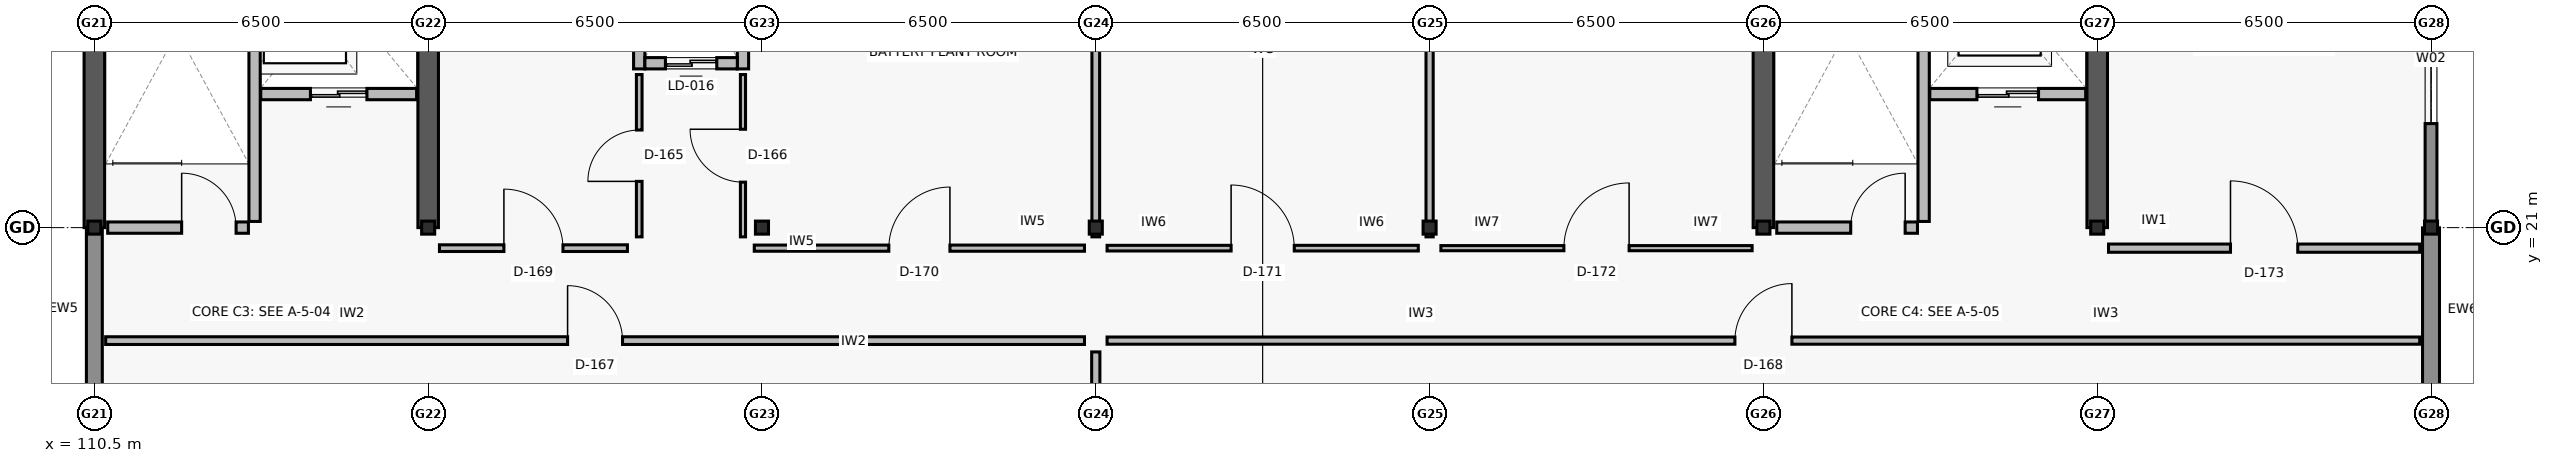
"""IFC4 building model, lengths in metres.
Left out: names, types, materials, properties, quantities, classifications, styles, units other than length and angle.
Written with IfcOpenShell. Run it as: python <this file> out.ifc"""

import sys

from ifc_helpers import new_model, si_unit, direction, frame, frame_2d, origin, origin_2d, place, context, subcontext, project, spatial, rectangle, i_section, extrude, element, fill, save


model = new_model("IFC4")
c1 = context("Model", 3, precision=1e-05, world=origin(), true_north=direction((0.0, 1.0)))
c2 = subcontext(c1, "Body", "Model", "MODEL_VIEW")
j1 = project(units=[si_unit("LENGTHUNIT", "METRE"), si_unit("PLANEANGLEUNIT", "RADIAN")], contexts=[c1])
p1 = place(None, origin())
s1 = spatial("IfcSite", under=j1, at=p1, CompositionType="ELEMENT")
p2 = place(p1, origin())
s2 = spatial("IfcBuilding", under=s1, at=p2, CompositionType="ELEMENT")
p3 = place(p2, frame((0.0, 0.0, 21.3)))
s3 = spatial("IfcBuildingStorey", under=s2, at=p3, CompositionType="ELEMENT", Elevation=21.3)
for number, where, z_axis, x_axis in (
    (1, (110.5, 21.0, 0.0), (0.0, 0.0, 1.0), (1.0, 0.0, 0.0)),
    (2, (117.0, 21.0, 0.0), (0.0, 0.0, 1.0), (1.0, 0.0, 0.0)),
    (3, (123.5, 21.0, 0.0), (0.0, 0.0, 1.0), (1.0, 0.0, 0.0)),
    (4, (130.0, 21.0, 0.0), (0.0, 0.0, 1.0), (1.0, 0.0, 0.0)),
    (5, (136.5, 21.0, 0.0), (0.0, 0.0, 1.0), (1.0, 0.0, 0.0)),
    (6, (143.0, 21.0, 0.0), (0.0, 0.0, 1.0), (1.0, 0.0, 0.0)),
    (7, (149.5, 21.0, 0.0), (0.0, 0.0, 1.0), (1.0, 0.0, 0.0)),
    (8, (156.0, 21.0, 0.0), (0.0, 0.0, 1.0), (1.0, 0.0, 0.0)),
):
    element("IfcColumn", number, at=place(p3, frame(where, z_axis=z_axis, x_axis=x_axis)), inside=s3, PredefinedType="COLUMN", context=c2, shape_type="SweptSolid", body=[
        extrude(i_section(OverallWidth=0.254, OverallDepth=0.254, WebThickness=0.009, FlangeThickness=0.014, FilletRadius=0.013, at=origin_2d()), origin(), (0.0, 0.0, 1.0), 3.9),
    ])
for number, where, z_axis, x_axis in (
    (9, (110.5, 21.0, 0.0), (0.0, 0.0, 1.0), (0.0, 1.0, 0.0)),
    (10, (117.0, 21.0, 0.0), (0.0, 0.0, 1.0), (0.0, 1.0, 0.0)),
    (11, (143.0, 21.0, 0.0), (0.0, 0.0, 1.0), (0.0, 1.0, 0.0)),
    (12, (149.5, 21.0, 0.0), (0.0, 0.0, 1.0), (0.0, 1.0, 0.0)),
):
    element("IfcWall", number, at=place(p3, frame(where, z_axis=z_axis, x_axis=x_axis)), inside=s3, PredefinedType="SHEAR", context=c2, shape_type="SweptSolid", body=[
        extrude(rectangle(XDim=6.4, YDim=0.4, at=frame_2d((3.2, 0.0))), origin(), (0.0, 0.0, 1.0), 3.66),
    ])
p4 = place(p3, frame((110.5, 14.405, 0.0), z_axis=(0.0, 0.0, 1.0), x_axis=(0.0, 1.0, 0.0)))
e13 = element("IfcWall", 13, at=p4, inside=s3, PredefinedType="SOLIDWALL", context=c2, shape_type="SweptSolid", body=[
    extrude(rectangle(XDim=6.59, YDim=0.31, at=frame_2d((3.295, 0.0))), origin(), (0.0, 0.0, 1.0), 3.02),
])
p5 = place(p4, frame((0.988, 0.0, 0.8)))
e14 = element("IfcOpeningElement", 14, at=p5, cuts=e13, PredefinedType="OPENING", context=c2, shape_type="SweptSolid", body=[
    extrude(rectangle(XDim=2.45, YDim=1.95, at=frame_2d((1.225, 0.975))), frame((0.0, 0.165, 0.0), z_axis=(0.0, -1.0, 0.0), x_axis=(1.0, 0.0, 0.0)), (0.0, 0.0, 1.0), 0.33),
])
p6 = place(p3, frame((156.0, 20.995, 0.0), z_axis=(0.0, 0.0, 1.0), x_axis=(0.0, -1.0, 0.0)))
e15 = element("IfcWall", 15, at=p6, inside=s3, PredefinedType="SOLIDWALL", context=c2, shape_type="SweptSolid", body=[
    extrude(rectangle(XDim=6.59, YDim=0.33, at=frame_2d((3.295, 0.0))), origin(), (0.0, 0.0, 1.0), 3.02),
])
p7 = place(p6, frame((3.177, 0.0, 0.72)))
e16 = element("IfcOpeningElement", 16, at=p7, cuts=e15, PredefinedType="OPENING", context=c2, shape_type="SweptSolid", body=[
    extrude(rectangle(XDim=2.4, YDim=2.1, at=frame_2d((1.2, 1.05))), frame((0.0, 0.175, 0.0), z_axis=(0.0, -1.0, 0.0), x_axis=(1.0, 0.0, 0.0)), (0.0, 0.0, 1.0), 0.35),
])
p8 = place(p3, frame((156.0, 27.595, 0.0), z_axis=(0.0, 0.0, 1.0), x_axis=(0.0, -1.0, 0.0)))
e17 = element("IfcWall", 17, at=p8, inside=s3, PredefinedType="SOLIDWALL", context=c2, shape_type="SweptSolid", body=[
    extrude(rectangle(XDim=6.59, YDim=0.23, at=frame_2d((3.295, 0.0))), origin(), (0.0, 0.0, 1.0), 3.02),
])
p9 = place(p8, frame((2.02, 0.0, 0.72)))
e18 = element("IfcOpeningElement", 18, at=p9, cuts=e17, PredefinedType="OPENING", context=c2, shape_type="SweptSolid", body=[
    extrude(rectangle(XDim=2.55, YDim=2.1, at=frame_2d((1.275, 1.05))), frame((0.0, 0.125, 0.0), z_axis=(0.0, -1.0, 0.0), x_axis=(1.0, 0.0, 0.0)), (0.0, 0.0, 1.0), 0.25),
])
p10 = place(p3, frame((113.62, 21.12, 0.0), z_axis=(0.0, 0.0, 1.0), x_axis=(0.0, 1.0, 0.0)))
e19 = element("IfcWall", 19, at=p10, inside=s3, PredefinedType="SOLIDWALL", context=c2, shape_type="SweptSolid", body=[
    extrude(rectangle(XDim=6.255, YDim=0.22, at=frame_2d((3.127, 0.0))), origin(), (0.0, 0.0, 1.0), 3.02),
])
p11 = place(p3, frame((110.76, 21.0, 0.0), z_axis=(0.0, 0.0, 1.0), x_axis=(1.0, 0.0, 0.0)))
e20 = element("IfcWall", 20, at=p11, inside=s3, PredefinedType="SOLIDWALL", context=c2, shape_type="SweptSolid", body=[
    extrude(rectangle(XDim=2.74, YDim=0.22, at=frame_2d((1.37, 0.0))), origin(), (0.0, 0.0, 1.0), 3.02),
])
p12 = place(p11, frame((1.44, 0.0, 0.0)))
e21 = element("IfcOpeningElement", 21, at=p12, cuts=e20, PredefinedType="OPENING", context=c2, shape_type="SweptSolid", body=[
    extrude(rectangle(XDim=1.06, YDim=2.1, at=frame_2d((0.53, 1.05))), frame((0.0, 0.12, 0.0), z_axis=(0.0, -1.0, 0.0), x_axis=(1.0, 0.0, 0.0)), (0.0, 0.0, 1.0), 0.24),
])
p13 = place(p3, frame((113.74, 23.6, 0.0), z_axis=(0.0, 0.0, 1.0), x_axis=(1.0, 0.0, 0.0)))
e22 = element("IfcWall", 22, at=p13, inside=s3, PredefinedType="SOLIDWALL", context=c2, shape_type="SweptSolid", body=[
    extrude(rectangle(XDim=3.035, YDim=0.22, at=frame_2d((1.518, 0.0))), origin(), (0.0, 0.0, 1.0), 3.02),
])
p14 = place(p13, frame((0.968, 0.0, 0.0)))
e23 = element("IfcOpeningElement", 23, at=p14, cuts=e22, PredefinedType="OPENING", context=c2, shape_type="SweptSolid", body=[
    extrude(rectangle(XDim=1.1, YDim=2.1, at=frame_2d((0.55, 1.05))), frame((0.0, 0.12, 0.0), z_axis=(0.0, -1.0, 0.0), x_axis=(1.0, 0.0, 0.0)), (0.0, 0.0, 1.0), 0.24),
])
for number, where, z_axis, x_axis in (
    (24, (121.11, 24.09, 0.0), (0.0, 0.0, 1.0), (0.0, 1.0, 0.0)),
    (25, (123.13, 24.09, 0.0), (0.0, 0.0, 1.0), (0.0, 1.0, 0.0)),
):
    element("IfcWall", number, at=place(p3, frame(where, z_axis=z_axis, x_axis=x_axis)), inside=s3, PredefinedType="SOLIDWALL", context=c2, shape_type="SweptSolid", body=[
        extrude(rectangle(XDim=3.36, YDim=0.22, at=frame_2d((1.68, 0.0))), origin(), (0.0, 0.0, 1.0), 3.02),
    ])
p15 = place(p3, frame((121.22, 24.2, 0.0), z_axis=(0.0, 0.0, 1.0), x_axis=(1.0, 0.0, 0.0)))
e26 = element("IfcWall", 26, at=p15, inside=s3, PredefinedType="SOLIDWALL", context=c2, shape_type="SweptSolid", body=[
    extrude(rectangle(XDim=1.8, YDim=0.22, at=frame_2d((0.9, 0.0))), origin(), (0.0, 0.0, 1.0), 3.02),
])
p16 = place(p15, frame((0.4, 0.0, 0.0)))
e27 = element("IfcOpeningElement", 27, at=p16, cuts=e26, PredefinedType="OPENING", context=c2, shape_type="SweptSolid", body=[
    extrude(rectangle(XDim=1.0, YDim=2.1, at=frame_2d((0.5, 1.05))), frame((0.0, 0.12, 0.0), z_axis=(0.0, -1.0, 0.0), x_axis=(1.0, 0.0, 0.0)), (0.0, 0.0, 1.0), 0.24),
])
p17 = place(p3, frame((146.12, 21.12, 0.0), z_axis=(0.0, 0.0, 1.0), x_axis=(0.0, 1.0, 0.0)))
e28 = element("IfcWall", 28, at=p17, inside=s3, PredefinedType="SOLIDWALL", context=c2, shape_type="SweptSolid", body=[
    extrude(rectangle(XDim=6.255, YDim=0.22, at=frame_2d((3.127, 0.0))), origin(), (0.0, 0.0, 1.0), 3.02),
])
p18 = place(p3, frame((143.26, 21.0, 0.0), z_axis=(0.0, 0.0, 1.0), x_axis=(1.0, 0.0, 0.0)))
e29 = element("IfcWall", 29, at=p18, inside=s3, PredefinedType="SOLIDWALL", context=c2, shape_type="SweptSolid", body=[
    extrude(rectangle(XDim=2.74, YDim=0.22, at=frame_2d((1.37, 0.0))), origin(), (0.0, 0.0, 1.0), 3.02),
])
p19 = place(p18, frame((1.44, 0.0, 0.0)))
e30 = element("IfcOpeningElement", 30, at=p19, cuts=e29, PredefinedType="OPENING", context=c2, shape_type="SweptSolid", body=[
    extrude(rectangle(XDim=1.06, YDim=2.1, at=frame_2d((0.53, 1.05))), frame((0.0, 0.12, 0.0), z_axis=(0.0, -1.0, 0.0), x_axis=(1.0, 0.0, 0.0)), (0.0, 0.0, 1.0), 0.24),
])
p20 = place(p3, frame((146.24, 23.6, 0.0), z_axis=(0.0, 0.0, 1.0), x_axis=(1.0, 0.0, 0.0)))
e31 = element("IfcWall", 31, at=p20, inside=s3, PredefinedType="SOLIDWALL", context=c2, shape_type="SweptSolid", body=[
    extrude(rectangle(XDim=3.035, YDim=0.22, at=frame_2d((1.518, 0.0))), origin(), (0.0, 0.0, 1.0), 3.02),
])
p21 = place(p20, frame((0.917, 0.0, 0.0)))
e32 = element("IfcOpeningElement", 32, at=p21, cuts=e31, PredefinedType="OPENING", context=c2, shape_type="SweptSolid", body=[
    extrude(rectangle(XDim=1.2, YDim=2.15, at=frame_2d((0.6, 1.075))), frame((0.0, 0.12, 0.0), z_axis=(0.0, -1.0, 0.0), x_axis=(1.0, 0.0, 0.0)), (0.0, 0.0, 1.0), 0.24),
])
p22 = place(p3, frame((121.11, 20.82, 0.0), z_axis=(0.0, 0.0, 1.0), x_axis=(0.0, 1.0, 0.0)))
e33 = element("IfcWall", 33, at=p22, inside=s3, PredefinedType="PARTITIONING", context=c2, shape_type="SweptSolid", body=[
    extrude(rectangle(XDim=3.16, YDim=0.11, at=frame_2d((1.58, 0.0))), origin(), (0.0, 0.0, 1.0), 3.0),
])
p23 = place(p22, frame((1.08, 0.0, 0.0)))
e34 = element("IfcOpeningElement", 34, at=p23, cuts=e33, PredefinedType="OPENING", context=c2, shape_type="SweptSolid", body=[
    extrude(rectangle(XDim=1.0, YDim=2.12, at=frame_2d((0.5, 1.06))), frame((0.0, 0.065, 0.0), z_axis=(0.0, -1.0, 0.0), x_axis=(1.0, 0.0, 0.0)), (0.0, 0.0, 1.0), 0.13),
])
p24 = place(p3, frame((123.13, 20.82, 0.0), z_axis=(0.0, 0.0, 1.0), x_axis=(0.0, 1.0, 0.0)))
e35 = element("IfcWall", 35, at=p24, inside=s3, PredefinedType="PARTITIONING", context=c2, shape_type="SweptSolid", body=[
    extrude(rectangle(XDim=3.16, YDim=0.1, at=frame_2d((1.58, 0.0))), origin(), (0.0, 0.0, 1.0), 3.0),
])
p25 = place(p24, frame((1.065, 0.0, 0.0)))
e36 = element("IfcOpeningElement", 36, at=p25, cuts=e35, PredefinedType="OPENING", context=c2, shape_type="SweptSolid", body=[
    extrude(rectangle(XDim=1.03, YDim=2.06, at=frame_2d((0.515, 1.03))), frame((0.0, 0.06, 0.0), z_axis=(0.0, -1.0, 0.0), x_axis=(1.0, 0.0, 0.0)), (0.0, 0.0, 1.0), 0.12),
])
p26 = place(p3, frame((130.0, 14.62, 0.0), z_axis=(0.0, 0.0, 1.0), x_axis=(0.0, 1.0, 0.0)))
e37 = element("IfcWall", 37, at=p26, inside=s3, PredefinedType="PARTITIONING", context=c2, shape_type="SweptSolid", body=[
    extrude(rectangle(XDim=3.96, YDim=0.16, at=frame_2d((1.98, 0.0))), origin(), (0.0, 0.0, 1.0), 3.0),
])
p27 = place(p3, frame((110.72, 18.8, 0.0), z_axis=(0.0, 0.0, 1.0), x_axis=(1.0, 0.0, 0.0)))
e38 = element("IfcWall", 38, at=p27, inside=s3, PredefinedType="PARTITIONING", context=c2, shape_type="SweptSolid", body=[
    extrude(rectangle(XDim=19.06, YDim=0.15, at=frame_2d((9.53, 0.0))), origin(), (0.0, 0.0, 1.0), 3.0),
])
p28 = place(p27, frame((8.995, 0.0, 0.0)))
e39 = element("IfcOpeningElement", 39, at=p28, cuts=e38, PredefinedType="OPENING", context=c2, shape_type="SweptSolid", body=[
    extrude(rectangle(XDim=1.07, YDim=2.08, at=frame_2d((0.535, 1.04))), frame((0.0, 0.085, 0.0), z_axis=(0.0, -1.0, 0.0), x_axis=(1.0, 0.0, 0.0)), (0.0, 0.0, 1.0), 0.17),
])
p29 = place(p3, frame((130.22, 18.8, 0.0), z_axis=(0.0, 0.0, 1.0), x_axis=(1.0, 0.0, 0.0)))
e40 = element("IfcWall", 40, at=p29, inside=s3, PredefinedType="PARTITIONING", context=c2, shape_type="SweptSolid", body=[
    extrude(rectangle(XDim=25.56, YDim=0.14, at=frame_2d((12.78, 0.0))), origin(), (0.0, 0.0, 1.0), 3.0),
])
p30 = place(p29, frame((12.225, 0.0, 0.0)))
e41 = element("IfcOpeningElement", 41, at=p30, cuts=e40, PredefinedType="OPENING", context=c2, shape_type="SweptSolid", body=[
    extrude(rectangle(XDim=1.11, YDim=2.1, at=frame_2d((0.555, 1.05))), frame((0.0, 0.08, 0.0), z_axis=(0.0, -1.0, 0.0), x_axis=(1.0, 0.0, 0.0)), (0.0, 0.0, 1.0), 0.16),
])
p31 = place(p3, frame((117.22, 20.6, 0.0), z_axis=(0.0, 0.0, 1.0), x_axis=(1.0, 0.0, 0.0)))
e42 = element("IfcWall", 42, at=p31, inside=s3, PredefinedType="PARTITIONING", context=c2, shape_type="SweptSolid", body=[
    extrude(rectangle(XDim=3.66, YDim=0.13, at=frame_2d((1.83, 0.0))), origin(), (0.0, 0.0, 1.0), 3.0),
])
p32 = place(p31, frame((1.255, 0.0, 0.0)))
e43 = element("IfcOpeningElement", 43, at=p32, cuts=e42, PredefinedType="OPENING", context=c2, shape_type="SweptSolid", body=[
    extrude(rectangle(XDim=1.15, YDim=2.12, at=frame_2d((0.575, 1.06))), frame((0.0, 0.075, 0.0), z_axis=(0.0, -1.0, 0.0), x_axis=(1.0, 0.0, 0.0)), (0.0, 0.0, 1.0), 0.15),
])
p33 = place(p3, frame((123.35, 20.6, 0.0), z_axis=(0.0, 0.0, 1.0), x_axis=(1.0, 0.0, 0.0)))
e44 = element("IfcWall", 44, at=p33, inside=s3, PredefinedType="PARTITIONING", context=c2, shape_type="SweptSolid", body=[
    extrude(rectangle(XDim=6.43, YDim=0.12, at=frame_2d((3.215, 0.0))), origin(), (0.0, 0.0, 1.0), 3.0),
])
p34 = place(p33, frame((2.62, 0.0, 0.0)))
e45 = element("IfcOpeningElement", 45, at=p34, cuts=e44, PredefinedType="OPENING", context=c2, shape_type="SweptSolid", body=[
    extrude(rectangle(XDim=1.19, YDim=2.14, at=frame_2d((0.595, 1.07))), frame((0.0, 0.07, 0.0), z_axis=(0.0, -1.0, 0.0), x_axis=(1.0, 0.0, 0.0)), (0.0, 0.0, 1.0), 0.14),
])
p35 = place(p3, frame((130.22, 20.6, 0.0), z_axis=(0.0, 0.0, 1.0), x_axis=(1.0, 0.0, 0.0)))
e46 = element("IfcWall", 46, at=p35, inside=s3, PredefinedType="PARTITIONING", context=c2, shape_type="SweptSolid", body=[
    extrude(rectangle(XDim=6.06, YDim=0.11, at=frame_2d((3.03, 0.0))), origin(), (0.0, 0.0, 1.0), 3.0),
])
p36 = place(p35, frame((2.415, 0.0, 0.0)))
e47 = element("IfcOpeningElement", 47, at=p36, cuts=e46, PredefinedType="OPENING", context=c2, shape_type="SweptSolid", body=[
    extrude(rectangle(XDim=1.23, YDim=2.08, at=frame_2d((0.615, 1.04))), frame((0.0, 0.065, 0.0), z_axis=(0.0, -1.0, 0.0), x_axis=(1.0, 0.0, 0.0)), (0.0, 0.0, 1.0), 0.13),
])
p37 = place(p3, frame((136.72, 20.6, 0.0), z_axis=(0.0, 0.0, 1.0), x_axis=(1.0, 0.0, 0.0)))
e48 = element("IfcWall", 48, at=p37, inside=s3, PredefinedType="PARTITIONING", context=c2, shape_type="SweptSolid", body=[
    extrude(rectangle(XDim=6.06, YDim=0.1, at=frame_2d((3.03, 0.0))), origin(), (0.0, 0.0, 1.0), 3.0),
])
p38 = place(p37, frame((2.395, 0.0, 0.0)))
e49 = element("IfcOpeningElement", 49, at=p38, cuts=e48, PredefinedType="OPENING", context=c2, shape_type="SweptSolid", body=[
    extrude(rectangle(XDim=1.27, YDim=2.1, at=frame_2d((0.635, 1.05))), frame((0.0, 0.06, 0.0), z_axis=(0.0, -1.0, 0.0), x_axis=(1.0, 0.0, 0.0)), (0.0, 0.0, 1.0), 0.12),
])
p39 = place(p3, frame((149.72, 20.6, 0.0), z_axis=(0.0, 0.0, 1.0), x_axis=(1.0, 0.0, 0.0)))
e50 = element("IfcWall", 50, at=p39, inside=s3, PredefinedType="PARTITIONING", context=c2, shape_type="SweptSolid", body=[
    extrude(rectangle(XDim=6.06, YDim=0.16, at=frame_2d((3.03, 0.0))), origin(), (0.0, 0.0, 1.0), 3.0),
])
p40 = place(p39, frame((2.375, 0.0, 0.0)))
e51 = element("IfcOpeningElement", 51, at=p40, cuts=e50, PredefinedType="OPENING", context=c2, shape_type="SweptSolid", body=[
    extrude(rectangle(XDim=1.31, YDim=2.14, at=frame_2d((0.655, 1.07))), frame((0.0, 0.09, 0.0), z_axis=(0.0, -1.0, 0.0), x_axis=(1.0, 0.0, 0.0)), (0.0, 0.0, 1.0), 0.18),
])
p41 = place(p3, frame((130.0, 20.82, 0.0), z_axis=(0.0, 0.0, 1.0), x_axis=(0.0, 1.0, 0.0)))
e52 = element("IfcWall", 52, at=p41, inside=s3, PredefinedType="PARTITIONING", context=c2, shape_type="SweptSolid", body=[
    extrude(rectangle(XDim=6.56, YDim=0.15, at=frame_2d((3.28, 0.0))), origin(), (0.0, 0.0, 1.0), 3.0),
])
p42 = place(p3, frame((136.5, 20.82, 0.0), z_axis=(0.0, 0.0, 1.0), x_axis=(0.0, 1.0, 0.0)))
e53 = element("IfcWall", 53, at=p42, inside=s3, PredefinedType="PARTITIONING", context=c2, shape_type="SweptSolid", body=[
    extrude(rectangle(XDim=6.56, YDim=0.14, at=frame_2d((3.28, 0.0))), origin(), (0.0, 0.0, 1.0), 3.0),
])
p43 = place(p9, origin())
e54 = element("IfcWindow", 54, at=p43, inside=s3, PartitioningType="TRIPLE_PANEL_VERTICAL", PredefinedType="WINDOW", context=c2, shape_type="SweptSolid", body=[
    extrude(rectangle(XDim=2.55, YDim=2.1, at=frame_2d((1.275, 1.05))), frame((0.0, 0.03, 0.0), z_axis=(0.0, -1.0, 0.0), x_axis=(1.0, 0.0, 0.0)), (0.0, 0.0, 1.0), 0.06),
])
fill(e18, e54)
p44 = place(p12, origin())
e55 = element("IfcDoor", 55, at=p44, inside=s3, OperationType="SINGLE_SWING_LEFT", PredefinedType="DOOR", context=c2, shape_type="SweptSolid", body=[
    extrude(rectangle(XDim=1.06, YDim=2.1, at=frame_2d((0.53, 1.05))), frame((0.0, 0.025, 0.0), z_axis=(0.0, -1.0, 0.0), x_axis=(1.0, 0.0, 0.0)), (0.0, 0.0, 1.0), 0.05),
])
fill(e21, e55)
p45 = place(p14, origin())
e56 = element("IfcDoor", 56, at=p45, inside=s3, OperationType="DOUBLE_DOOR_SLIDING", PredefinedType="DOOR", context=c2, shape_type="SweptSolid", body=[
    extrude(rectangle(XDim=1.1, YDim=2.1, at=frame_2d((0.55, 1.05))), frame((0.0, 0.025, 0.0), z_axis=(0.0, -1.0, 0.0), x_axis=(1.0, 0.0, 0.0)), (0.0, 0.0, 1.0), 0.05),
])
fill(e23, e56)
p46 = place(p16, origin())
e57 = element("IfcDoor", 57, at=p46, inside=s3, OperationType="DOUBLE_DOOR_SLIDING", PredefinedType="DOOR", context=c2, shape_type="SweptSolid", body=[
    extrude(rectangle(XDim=1.0, YDim=2.1, at=frame_2d((0.5, 1.05))), frame((0.0, 0.025, 0.0), z_axis=(0.0, -1.0, 0.0), x_axis=(1.0, 0.0, 0.0)), (0.0, 0.0, 1.0), 0.05),
])
fill(e27, e57)
p47 = place(p19, origin())
e58 = element("IfcDoor", 58, at=p47, inside=s3, OperationType="SINGLE_SWING_RIGHT", PredefinedType="DOOR", context=c2, shape_type="SweptSolid", body=[
    extrude(rectangle(XDim=1.06, YDim=2.1, at=frame_2d((0.53, 1.05))), frame((0.0, 0.025, 0.0), z_axis=(0.0, -1.0, 0.0), x_axis=(1.0, 0.0, 0.0)), (0.0, 0.0, 1.0), 0.05),
])
fill(e30, e58)
p48 = place(p21, origin())
e59 = element("IfcDoor", 59, at=p48, inside=s3, OperationType="DOUBLE_DOOR_SLIDING", PredefinedType="DOOR", context=c2, shape_type="SweptSolid", body=[
    extrude(rectangle(XDim=1.2, YDim=2.15, at=frame_2d((0.6, 1.075))), frame((0.0, 0.025, 0.0), z_axis=(0.0, -1.0, 0.0), x_axis=(1.0, 0.0, 0.0)), (0.0, 0.0, 1.0), 0.05),
])
fill(e32, e59)
p49 = place(p23, origin())
e60 = element("IfcDoor", 60, at=p49, inside=s3, OperationType="SINGLE_SWING_LEFT", PredefinedType="DOOR", context=c2, shape_type="SweptSolid", body=[
    extrude(rectangle(XDim=1.0, YDim=2.12, at=frame_2d((0.5, 1.06))), frame((0.0, 0.025, 0.0), z_axis=(0.0, -1.0, 0.0), x_axis=(1.0, 0.0, 0.0)), (0.0, 0.0, 1.0), 0.05),
])
fill(e34, e60)
p50 = place(p25, origin())
e61 = element("IfcDoor", 61, at=p50, inside=s3, OperationType="SINGLE_SWING_RIGHT", PredefinedType="DOOR", context=c2, shape_type="SweptSolid", body=[
    extrude(rectangle(XDim=1.03, YDim=2.06, at=frame_2d((0.515, 1.03))), frame((0.0, 0.025, 0.0), z_axis=(0.0, -1.0, 0.0), x_axis=(1.0, 0.0, 0.0)), (0.0, 0.0, 1.0), 0.05),
])
fill(e36, e61)
p51 = place(p28, origin())
e62 = element("IfcDoor", 62, at=p51, inside=s3, OperationType="SINGLE_SWING_LEFT", PredefinedType="DOOR", context=c2, shape_type="SweptSolid", body=[
    extrude(rectangle(XDim=1.07, YDim=2.08, at=frame_2d((0.535, 1.04))), frame((0.0, 0.025, 0.0), z_axis=(0.0, -1.0, 0.0), x_axis=(1.0, 0.0, 0.0)), (0.0, 0.0, 1.0), 0.05),
])
fill(e39, e62)
p52 = place(p30, origin())
e63 = element("IfcDoor", 63, at=p52, inside=s3, OperationType="SINGLE_SWING_RIGHT", PredefinedType="DOOR", context=c2, shape_type="SweptSolid", body=[
    extrude(rectangle(XDim=1.11, YDim=2.1, at=frame_2d((0.555, 1.05))), frame((0.0, 0.025, 0.0), z_axis=(0.0, -1.0, 0.0), x_axis=(1.0, 0.0, 0.0)), (0.0, 0.0, 1.0), 0.05),
])
fill(e41, e63)
p53 = place(p32, origin())
e64 = element("IfcDoor", 64, at=p53, inside=s3, OperationType="SINGLE_SWING_LEFT", PredefinedType="DOOR", context=c2, shape_type="SweptSolid", body=[
    extrude(rectangle(XDim=1.15, YDim=2.12, at=frame_2d((0.575, 1.06))), frame((0.0, 0.025, 0.0), z_axis=(0.0, -1.0, 0.0), x_axis=(1.0, 0.0, 0.0)), (0.0, 0.0, 1.0), 0.05),
])
fill(e43, e64)
p54 = place(p34, origin())
e65 = element("IfcDoor", 65, at=p54, inside=s3, OperationType="SINGLE_SWING_RIGHT", PredefinedType="DOOR", context=c2, shape_type="SweptSolid", body=[
    extrude(rectangle(XDim=1.19, YDim=2.14, at=frame_2d((0.595, 1.07))), frame((0.0, 0.025, 0.0), z_axis=(0.0, -1.0, 0.0), x_axis=(1.0, 0.0, 0.0)), (0.0, 0.0, 1.0), 0.05),
])
fill(e45, e65)
p55 = place(p36, origin())
e66 = element("IfcDoor", 66, at=p55, inside=s3, OperationType="SINGLE_SWING_LEFT", PredefinedType="DOOR", context=c2, shape_type="SweptSolid", body=[
    extrude(rectangle(XDim=1.23, YDim=2.08, at=frame_2d((0.615, 1.04))), frame((0.0, 0.025, 0.0), z_axis=(0.0, -1.0, 0.0), x_axis=(1.0, 0.0, 0.0)), (0.0, 0.0, 1.0), 0.05),
])
fill(e47, e66)
p56 = place(p38, origin())
e67 = element("IfcDoor", 67, at=p56, inside=s3, OperationType="SINGLE_SWING_RIGHT", PredefinedType="DOOR", context=c2, shape_type="SweptSolid", body=[
    extrude(rectangle(XDim=1.27, YDim=2.1, at=frame_2d((0.635, 1.05))), frame((0.0, 0.025, 0.0), z_axis=(0.0, -1.0, 0.0), x_axis=(1.0, 0.0, 0.0)), (0.0, 0.0, 1.0), 0.05),
])
fill(e49, e67)
p57 = place(p40, origin())
e68 = element("IfcDoor", 68, at=p57, inside=s3, OperationType="SINGLE_SWING_LEFT", PredefinedType="DOOR", context=c2, shape_type="SweptSolid", body=[
    extrude(rectangle(XDim=1.31, YDim=2.14, at=frame_2d((0.655, 1.07))), frame((0.0, 0.025, 0.0), z_axis=(0.0, -1.0, 0.0), x_axis=(1.0, 0.0, 0.0)), (0.0, 0.0, 1.0), 0.05),
])
fill(e51, e68)
save(model, sys.argv[1])
